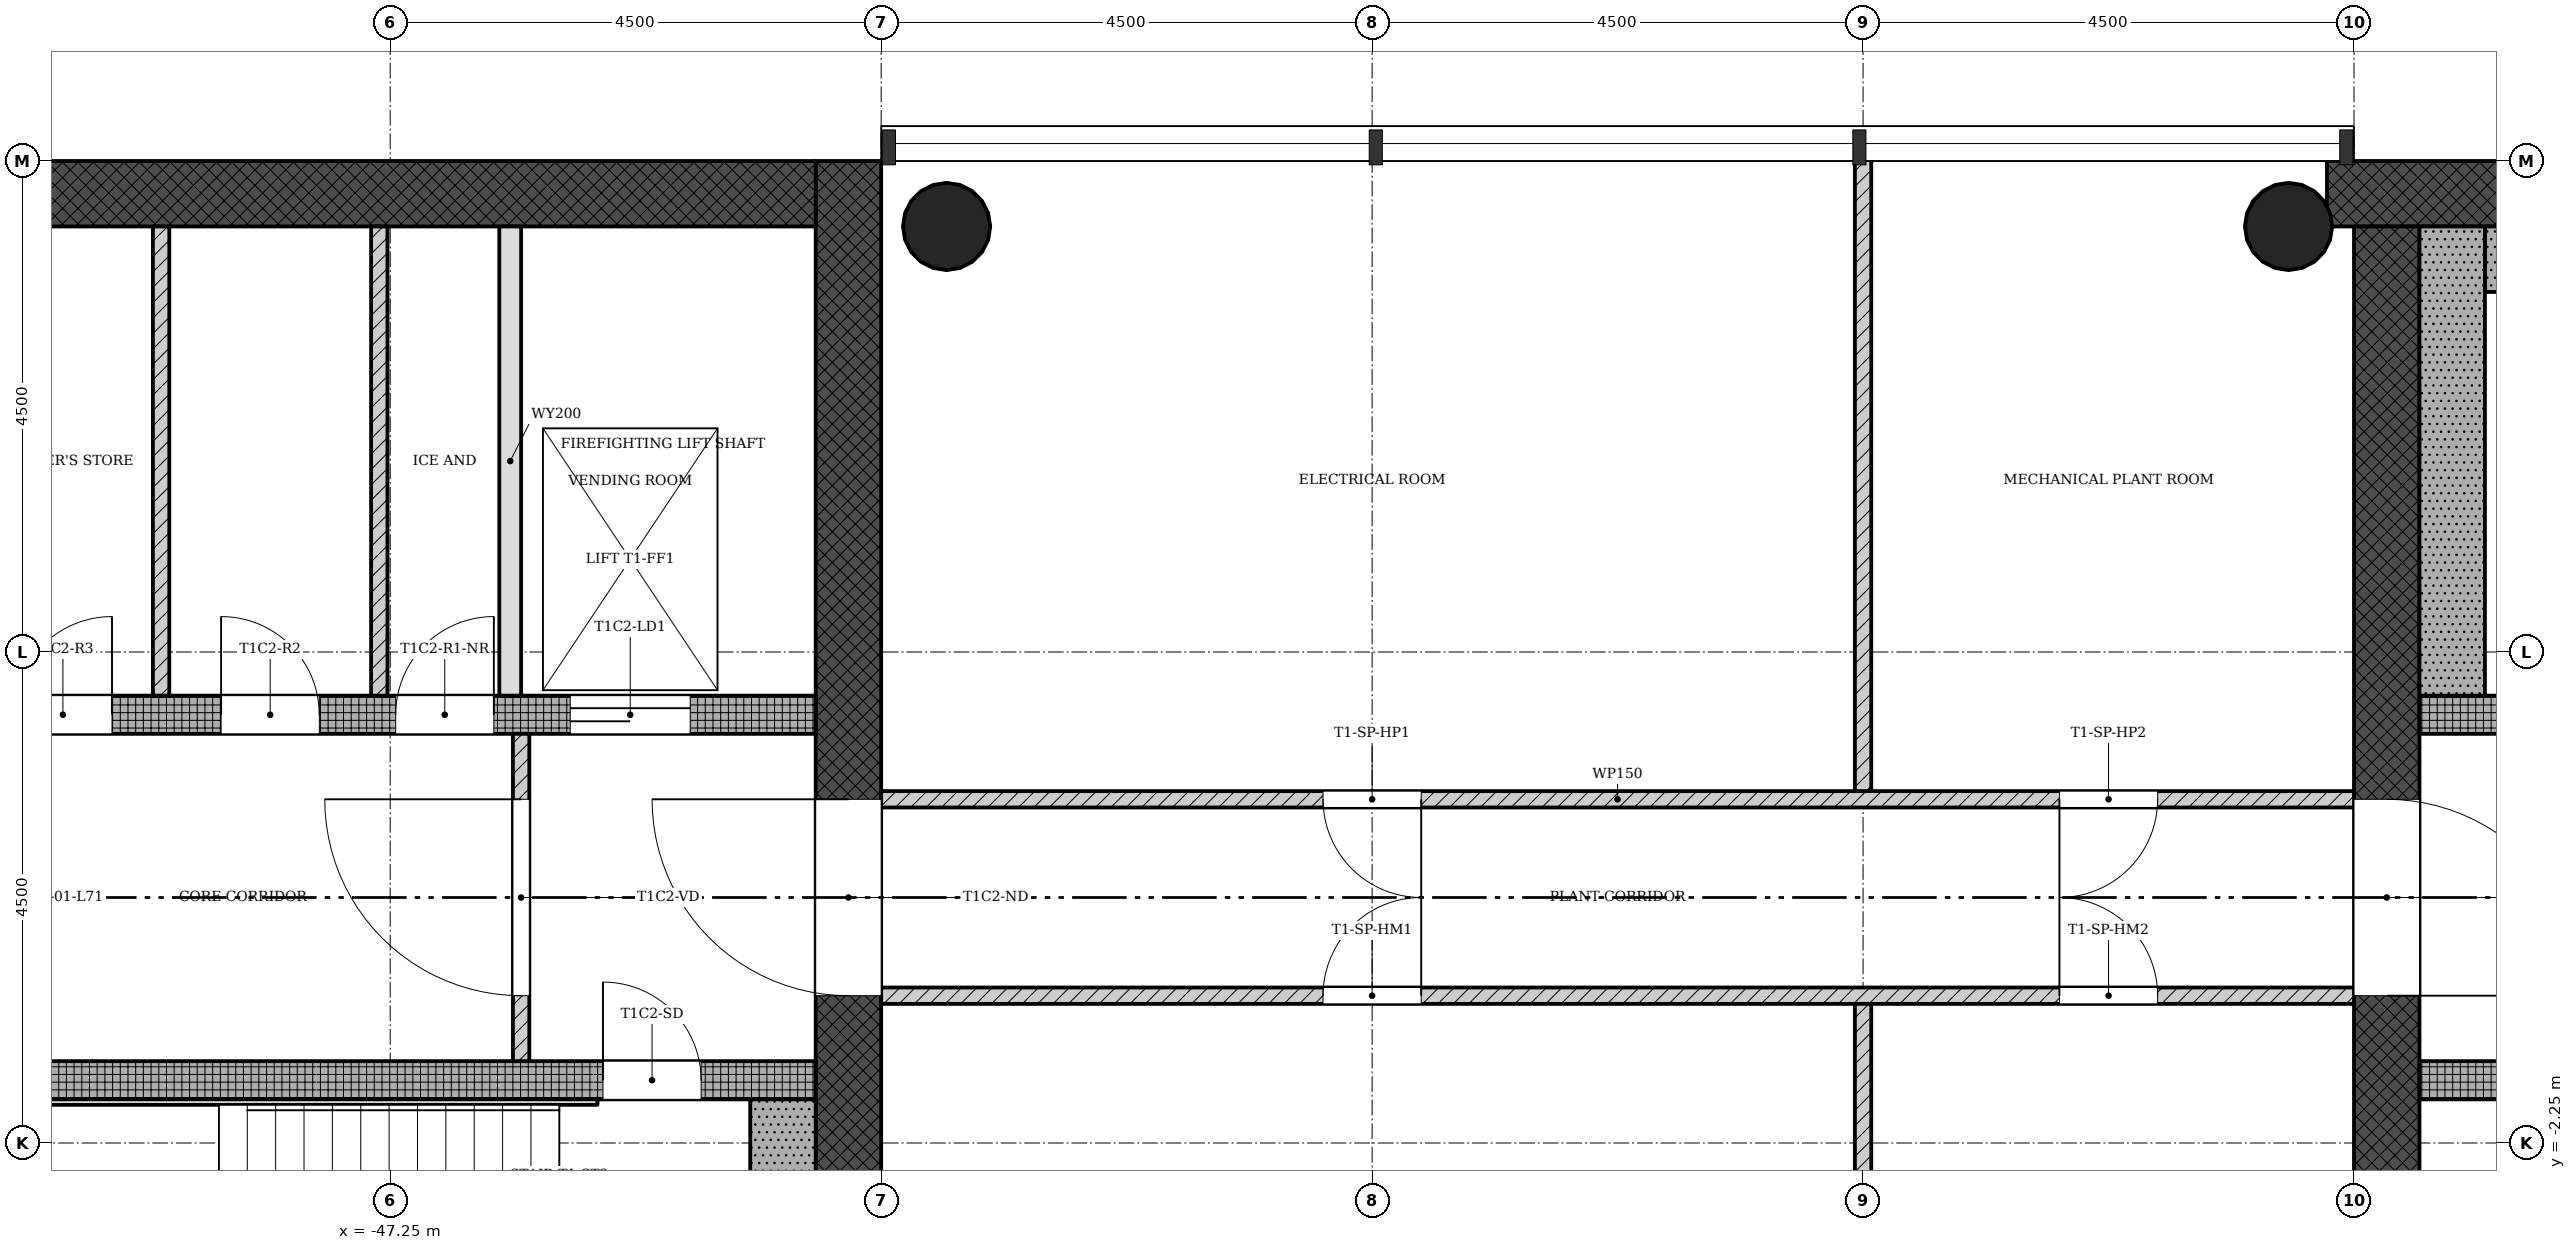
"""IFC4 building model, lengths in metres.
Left out: names, types, materials, properties, quantities, classifications, styles, units other than length and angle.
Written with IfcOpenShell. Run it as: python <this file> out.ifc"""

import sys

from ifc_helpers import new_model, si_unit, direction, frame, frame_2d, origin, origin_2d, place, context, subcontext, project, spatial, rectangle, hollow_circle, extrude, element, fill, save


model = new_model("IFC4")
c1 = context("Model", 3, precision=1e-05, world=origin(), true_north=direction((0.0, 1.0)))
c2 = subcontext(c1, "Body", "Model", "MODEL_VIEW")
j1 = project(units=[si_unit("LENGTHUNIT", "METRE"), si_unit("PLANEANGLEUNIT", "RADIAN")], contexts=[c1])
p1 = place(None, origin())
s1 = spatial("IfcSite", under=j1, at=p1, CompositionType="ELEMENT")
p2 = place(p1, origin())
s2 = spatial("IfcBuilding", under=s1, at=p2, CompositionType="ELEMENT")
p3 = place(p2, frame((0.0, 0.0, 260.4)))
s3 = spatial("IfcBuildingStorey", under=s2, at=p3, CompositionType="ELEMENT", Elevation=260.4)
p4 = place(p3, frame((-20.85, 6.45, 0.0), z_axis=(0.0, 0.0, 1.0), x_axis=(-1.0, 0.0, 0.0)))
e1 = element("IfcWall", 1, at=p4, inside=s3, PredefinedType="SHEAR", context=c2, shape_type="SweptSolid", body=[
    extrude(rectangle(XDim=8.648, YDim=0.6, at=frame_2d((4.324, 0.0))), origin(), (0.0, 0.0, 1.0), 4.5),
])
p5 = place(p3, frame((-28.95, 6.15, 0.0), z_axis=(0.0, 0.0, 1.0), x_axis=(0.0, -1.0, 0.0)))
e2 = element("IfcWall", 2, at=p5, inside=s3, PredefinedType="SHEAR", context=c2, shape_type="SweptSolid", body=[
    extrude(rectangle(XDim=12.9, YDim=0.6, at=frame_2d((6.45, 0.0))), origin(), (0.0, 0.0, 1.0), 4.5),
])
p6 = place(p5, frame((5.25, 0.0, 0.0)))
e3 = element("IfcOpeningElement", 3, at=p6, cuts=e2, PredefinedType="OPENING", context=c2, shape_type="SweptSolid", body=[
    extrude(rectangle(XDim=1.8, YDim=2.1, at=frame_2d((0.9, 1.05))), frame((0.0, 0.31, 0.0), z_axis=(0.0, -1.0, 0.0), x_axis=(1.0, 0.0, 0.0)), (0.0, 0.0, 1.0), 0.62),
])
p7 = place(p3, frame((-28.65, -1.675, 0.0), z_axis=(0.0, 0.0, 1.0), x_axis=(1.0, 0.0, 0.0)))
e4 = element("IfcWall", 4, at=p7, inside=s3, PredefinedType="SHEAR", context=c2, shape_type="SweptSolid", body=[
    extrude(rectangle(XDim=7.8, YDim=0.35, at=frame_2d((3.9, 0.0))), origin(), (0.0, 0.0, 1.0), 4.5),
])
p8 = place(p7, frame((1.15, 0.0, 0.0)))
e5 = element("IfcOpeningElement", 5, at=p8, cuts=e4, PredefinedType="OPENING", context=c2, shape_type="SweptSolid", body=[
    extrude(rectangle(XDim=0.9, YDim=2.1, at=frame_2d((0.45, 1.05))), frame((0.0, 0.185, 0.0), z_axis=(0.0, -1.0, 0.0), x_axis=(1.0, 0.0, 0.0)), (0.0, 0.0, 1.0), 0.37),
])
p9 = place(p7, frame((5.1, 0.0, 0.0)))
e6 = element("IfcOpeningElement", 6, at=p9, cuts=e4, PredefinedType="OPENING", context=c2, shape_type="SweptSolid", body=[
    extrude(rectangle(XDim=0.9, YDim=2.1, at=frame_2d((0.45, 1.05))), frame((0.0, 0.185, 0.0), z_axis=(0.0, -1.0, 0.0), x_axis=(1.0, 0.0, 0.0)), (0.0, 0.0, 1.0), 0.37),
])
p10 = place(p3, frame((-28.65, 1.675, 0.0), z_axis=(0.0, 0.0, 1.0), x_axis=(1.0, 0.0, 0.0)))
e7 = element("IfcWall", 7, at=p10, inside=s3, PredefinedType="SHEAR", context=c2, shape_type="SweptSolid", body=[
    extrude(rectangle(XDim=7.8, YDim=0.35, at=frame_2d((3.9, 0.0))), origin(), (0.0, 0.0, 1.0), 4.5),
])
p11 = place(p10, frame((1.05, 0.0, 0.0)))
e8 = element("IfcOpeningElement", 8, at=p11, cuts=e7, PredefinedType="OPENING", context=c2, shape_type="SweptSolid", body=[
    extrude(rectangle(XDim=0.9, YDim=2.1, at=frame_2d((0.45, 1.05))), frame((0.0, 0.185, 0.0), z_axis=(0.0, -1.0, 0.0), x_axis=(1.0, 0.0, 0.0)), (0.0, 0.0, 1.0), 0.37),
])
p12 = place(p3, frame((-43.05, -6.15, 0.0), z_axis=(0.0, 0.0, 1.0), x_axis=(0.0, 1.0, 0.0)))
e9 = element("IfcWall", 9, at=p12, inside=s3, PredefinedType="SHEAR", context=c2, shape_type="SweptSolid", body=[
    extrude(rectangle(XDim=12.9, YDim=0.6, at=frame_2d((6.45, 0.0))), origin(), (0.0, 0.0, 1.0), 4.5),
])
p13 = place(p12, frame((5.25, 0.0, 0.0)))
e10 = element("IfcOpeningElement", 10, at=p13, cuts=e9, PredefinedType="OPENING", context=c2, shape_type="SweptSolid", body=[
    extrude(rectangle(XDim=1.8, YDim=2.1, at=frame_2d((0.9, 1.05))), frame((0.0, 0.31, 0.0), z_axis=(0.0, -1.0, 0.0), x_axis=(1.0, 0.0, 0.0)), (0.0, 0.0, 1.0), 0.62),
])
p14 = place(p3, frame((-43.35, 6.45, 0.0), z_axis=(0.0, 0.0, 1.0), x_axis=(-1.0, 0.0, 0.0)))
e11 = element("IfcWall", 11, at=p14, inside=s3, PredefinedType="SHEAR", context=c2, shape_type="SweptSolid", body=[
    extrude(rectangle(XDim=8.4, YDim=0.6, at=frame_2d((4.2, 0.0))), origin(), (0.0, 0.0, 1.0), 4.5),
])
p15 = place(p3, frame((-51.15, -1.675, 0.0), z_axis=(0.0, 0.0, 1.0), x_axis=(1.0, 0.0, 0.0)))
e12 = element("IfcWall", 12, at=p15, inside=s3, PredefinedType="SHEAR", context=c2, shape_type="SweptSolid", body=[
    extrude(rectangle(XDim=7.8, YDim=0.35, at=frame_2d((3.9, 0.0))), origin(), (0.0, 0.0, 1.0), 4.5),
])
p16 = place(p15, frame((5.85, 0.0, 0.0)))
e13 = element("IfcOpeningElement", 13, at=p16, cuts=e12, PredefinedType="OPENING", context=c2, shape_type="SweptSolid", body=[
    extrude(rectangle(XDim=0.9, YDim=2.1, at=frame_2d((0.45, 1.05))), frame((0.0, 0.185, 0.0), z_axis=(0.0, -1.0, 0.0), x_axis=(1.0, 0.0, 0.0)), (0.0, 0.0, 1.0), 0.37),
])
p17 = place(p3, frame((-51.15, 1.675, 0.0), z_axis=(0.0, 0.0, 1.0), x_axis=(1.0, 0.0, 0.0)))
e14 = element("IfcWall", 14, at=p17, inside=s3, PredefinedType="SHEAR", context=c2, shape_type="SweptSolid", body=[
    extrude(rectangle(XDim=7.8, YDim=0.35, at=frame_2d((3.9, 0.0))), origin(), (0.0, 0.0, 1.0), 4.5),
])
p18 = place(p17, frame((5.55, 0.0, 0.0)))
e15 = element("IfcOpeningElement", 15, at=p18, cuts=e14, PredefinedType="OPENING", context=c2, shape_type="SweptSolid", body=[
    extrude(rectangle(XDim=1.1, YDim=2.1, at=frame_2d((0.55, 1.05))), frame((0.0, 0.185, 0.0), z_axis=(0.0, -1.0, 0.0), x_axis=(1.0, 0.0, 0.0)), (0.0, 0.0, 1.0), 0.37),
])
p19 = place(p17, frame((3.95, 0.0, 0.0)))
e16 = element("IfcOpeningElement", 16, at=p19, cuts=e14, PredefinedType="OPENING", context=c2, shape_type="SweptSolid", body=[
    extrude(rectangle(XDim=0.9, YDim=2.1, at=frame_2d((0.45, 1.05))), frame((0.0, 0.185, 0.0), z_axis=(0.0, -1.0, 0.0), x_axis=(1.0, 0.0, 0.0)), (0.0, 0.0, 1.0), 0.37),
])
p20 = place(p17, frame((2.35, 0.0, 0.0)))
e17 = element("IfcOpeningElement", 17, at=p20, cuts=e14, PredefinedType="OPENING", context=c2, shape_type="SweptSolid", body=[
    extrude(rectangle(XDim=0.9, YDim=2.1, at=frame_2d((0.45, 1.05))), frame((0.0, 0.185, 0.0), z_axis=(0.0, -1.0, 0.0), x_axis=(1.0, 0.0, 0.0)), (0.0, 0.0, 1.0), 0.37),
])
p21 = place(p17, frame((0.45, 0.0, 0.0)))
e18 = element("IfcOpeningElement", 18, at=p21, cuts=e14, PredefinedType="OPENING", context=c2, shape_type="SweptSolid", body=[
    extrude(rectangle(XDim=0.9, YDim=2.1, at=frame_2d((0.45, 1.05))), frame((0.0, 0.185, 0.0), z_axis=(0.0, -1.0, 0.0), x_axis=(1.0, 0.0, 0.0)), (0.0, 0.0, 1.0), 0.37),
])
for number, where, z_axis, x_axis in (
    (19, (-29.85, 6.15, 0.0), (0.0, 0.0, 1.0), (1.0, 0.0, 0.0)),
    (20, (-42.15, 6.15, 0.0), (0.0, 0.0, 1.0), (1.0, 0.0, 0.0)),
):
    element("IfcColumn", number, at=place(p3, frame(where, z_axis=z_axis, x_axis=x_axis)), inside=s3, PredefinedType="COLUMN", context=c2, shape_type="SweptSolid", body=[
        extrude(hollow_circle(Radius=0.4, WallThickness=0.028, at=origin_2d()), origin(), (0.0, 0.0, 1.0), 4.5),
    ])
p22 = place(p3, frame((-46.05, 1.5, 0.0), z_axis=(0.0, 0.0, 1.0), x_axis=(0.0, -1.0, 0.0)))
e21 = element("IfcWall", 21, at=p22, inside=s3, PredefinedType="PARTITIONING", context=c2, shape_type="SweptSolid", body=[
    extrude(rectangle(XDim=3.0, YDim=0.15, at=frame_2d((1.5, 0.0))), origin(), (0.0, 0.0, 1.0), 4.09),
])
p23 = place(p22, frame((0.6, 0.0, 0.0)))
e22 = element("IfcOpeningElement", 22, at=p23, cuts=e21, PredefinedType="OPENING", context=c2, shape_type="SweptSolid", body=[
    extrude(rectangle(XDim=1.8, YDim=2.1, at=frame_2d((0.9, 1.05))), frame((0.0, 0.085, 0.0), z_axis=(0.0, -1.0, 0.0), x_axis=(1.0, 0.0, 0.0)), (0.0, 0.0, 1.0), 0.17),
])
p24 = place(p3, frame((-46.15, 6.15, 0.0), z_axis=(0.0, 0.0, 1.0), x_axis=(0.0, -1.0, 0.0)))
e23 = element("IfcWall", 23, at=p24, inside=s3, PredefinedType="SOLIDWALL", context=c2, shape_type="SweptSolid", body=[
    extrude(rectangle(XDim=4.3, YDim=0.2, at=frame_2d((2.15, 0.0))), origin(), (0.0, 0.0, 1.0), 4.09),
])
for number, where, z_axis, x_axis in (
    (24, (-47.35, 6.15, 0.0), (0.0, 0.0, 1.0), (0.0, -1.0, 0.0)),
    (25, (-49.35, 6.15, 0.0), (0.0, 0.0, 1.0), (0.0, -1.0, 0.0)),
):
    element("IfcWall", number, at=place(p3, frame(where, z_axis=z_axis, x_axis=x_axis)), inside=s3, PredefinedType="PARTITIONING", context=c2, shape_type="SweptSolid", body=[
        extrude(rectangle(XDim=4.3, YDim=0.15, at=frame_2d((2.15, 0.0))), origin(), (0.0, 0.0, 1.0), 4.09),
    ])
p25 = place(p3, frame((-42.75, 0.9, 0.0), z_axis=(0.0, 0.0, 1.0), x_axis=(1.0, 0.0, 0.0)))
e26 = element("IfcWall", 26, at=p25, inside=s3, PredefinedType="PARTITIONING", context=c2, shape_type="SweptSolid", body=[
    extrude(rectangle(XDim=13.5, YDim=0.15, at=frame_2d((6.75, 0.0))), origin(), (0.0, 0.0, 1.0), 4.09),
])
p26 = place(p25, frame((4.05, 0.0, 0.0)))
e27 = element("IfcOpeningElement", 27, at=p26, cuts=e26, PredefinedType="OPENING", context=c2, shape_type="SweptSolid", body=[
    extrude(rectangle(XDim=0.9, YDim=2.1, at=frame_2d((0.45, 1.05))), frame((0.0, 0.085, 0.0), z_axis=(0.0, -1.0, 0.0), x_axis=(1.0, 0.0, 0.0)), (0.0, 0.0, 1.0), 0.17),
])
p27 = place(p25, frame((10.8, 0.0, 0.0)))
e28 = element("IfcOpeningElement", 28, at=p27, cuts=e26, PredefinedType="OPENING", context=c2, shape_type="SweptSolid", body=[
    extrude(rectangle(XDim=0.9, YDim=2.1, at=frame_2d((0.45, 1.05))), frame((0.0, 0.085, 0.0), z_axis=(0.0, -1.0, 0.0), x_axis=(1.0, 0.0, 0.0)), (0.0, 0.0, 1.0), 0.17),
])
p28 = place(p3, frame((-33.75, 0.975, 0.0), z_axis=(0.0, 0.0, 1.0), x_axis=(0.0, 1.0, 0.0)))
e29 = element("IfcWall", 29, at=p28, inside=s3, PredefinedType="PARTITIONING", context=c2, shape_type="SweptSolid", body=[
    extrude(rectangle(XDim=5.875, YDim=0.15, at=frame_2d((2.938, 0.0))), origin(), (0.0, 0.0, 1.0), 4.09),
])
p29 = place(p3, frame((-42.75, -0.9, 0.0), z_axis=(0.0, 0.0, 1.0), x_axis=(1.0, 0.0, 0.0)))
e30 = element("IfcWall", 30, at=p29, inside=s3, PredefinedType="PARTITIONING", context=c2, shape_type="SweptSolid", body=[
    extrude(rectangle(XDim=13.5, YDim=0.15, at=frame_2d((6.75, 0.0))), origin(), (0.0, 0.0, 1.0), 4.09),
])
p30 = place(p29, frame((4.05, 0.0, 0.0)))
e31 = element("IfcOpeningElement", 31, at=p30, cuts=e30, PredefinedType="OPENING", context=c2, shape_type="SweptSolid", body=[
    extrude(rectangle(XDim=0.9, YDim=2.1, at=frame_2d((0.45, 1.05))), frame((0.0, 0.085, 0.0), z_axis=(0.0, -1.0, 0.0), x_axis=(1.0, 0.0, 0.0)), (0.0, 0.0, 1.0), 0.17),
])
p31 = place(p29, frame((10.8, 0.0, 0.0)))
e32 = element("IfcOpeningElement", 32, at=p31, cuts=e30, PredefinedType="OPENING", context=c2, shape_type="SweptSolid", body=[
    extrude(rectangle(XDim=0.9, YDim=2.1, at=frame_2d((0.45, 1.05))), frame((0.0, 0.085, 0.0), z_axis=(0.0, -1.0, 0.0), x_axis=(1.0, 0.0, 0.0)), (0.0, 0.0, 1.0), 0.17),
])
p32 = place(p3, frame((-33.75, -0.975, 0.0), z_axis=(0.0, 0.0, 1.0), x_axis=(0.0, -1.0, 0.0)))
e33 = element("IfcWall", 33, at=p32, inside=s3, PredefinedType="PARTITIONING", context=c2, shape_type="SweptSolid", body=[
    extrude(rectangle(XDim=5.875, YDim=0.15, at=frame_2d((2.938, 0.0))), origin(), (0.0, 0.0, 1.0), 4.09),
])
p33 = place(p3, frame((-28.05, 5.85, 0.0), z_axis=(0.0, 0.0, 1.0), x_axis=(1.0, 0.0, 0.0)))
e34 = element("IfcWall", 34, at=p33, inside=s3, PredefinedType="SHEAR", context=c2, shape_type="SweptSolid", body=[
    extrude(rectangle(XDim=6.6, YDim=0.6, at=frame_2d((3.3, 0.0))), origin(), (0.0, 0.0, 1.0), 4.5),
])
for number, where, z_axis, x_axis in (
    (35, (-28.35, 1.85, 0.0), (0.0, 0.0, 1.0), (0.0, 1.0, 0.0)),
    (36, (-43.65, -1.85, 0.0), (0.0, 0.0, 1.0), (0.0, -1.0, 0.0)),
):
    element("IfcWall", number, at=place(p3, frame(where, z_axis=z_axis, x_axis=x_axis)), inside=s3, PredefinedType="SHEAR", context=c2, shape_type="SweptSolid", body=[
        extrude(rectangle(XDim=4.3, YDim=0.6, at=frame_2d((2.15, 0.0))), origin(), (0.0, 0.0, 1.0), 4.5),
    ])
p34 = place(p3, frame((-45.35, -1.875, 0.0), z_axis=(0.0, 0.0, 1.0), x_axis=(-1.0, 0.0, 0.0)))
e37 = element("IfcWall", 37, at=p34, inside=s3, PredefinedType="SHEAR", context=c2, shape_type="SweptSolid", body=[
    extrude(rectangle(XDim=5.2, YDim=0.05, at=frame_2d((2.6, 0.0))), origin(), (0.0, 0.0, 1.0), 4.5),
])
p35 = place(p23, origin())
e38 = element("IfcDoor", 38, at=p35, inside=s3, OperationType="SINGLE_SWING_LEFT", PredefinedType="DOOR", context=c2, shape_type="SweptSolid", body=[
    extrude(rectangle(XDim=1.8, YDim=2.1, at=frame_2d((0.9, 1.05))), frame((0.0, 0.025, 0.0), z_axis=(0.0, -1.0, 0.0), x_axis=(1.0, 0.0, 0.0)), (0.0, 0.0, 1.0), 0.05),
])
fill(e22, e38)
p36 = place(p26, origin())
e39 = element("IfcDoor", 39, at=p36, inside=s3, OperationType="SINGLE_SWING_RIGHT", PredefinedType="DOOR", context=c2, shape_type="SweptSolid", body=[
    extrude(rectangle(XDim=0.9, YDim=2.1, at=frame_2d((0.45, 1.05))), frame((0.0, 0.025, 0.0), z_axis=(0.0, -1.0, 0.0), x_axis=(1.0, 0.0, 0.0)), (0.0, 0.0, 1.0), 0.05),
])
fill(e27, e39)
p37 = place(p27, origin())
e40 = element("IfcDoor", 40, at=p37, inside=s3, OperationType="SINGLE_SWING_LEFT", PredefinedType="DOOR", context=c2, shape_type="SweptSolid", body=[
    extrude(rectangle(XDim=0.9, YDim=2.1, at=frame_2d((0.45, 1.05))), frame((0.0, 0.025, 0.0), z_axis=(0.0, -1.0, 0.0), x_axis=(1.0, 0.0, 0.0)), (0.0, 0.0, 1.0), 0.05),
])
fill(e28, e40)
p38 = place(p30, origin())
e41 = element("IfcDoor", 41, at=p38, inside=s3, OperationType="SINGLE_SWING_LEFT", PredefinedType="DOOR", context=c2, shape_type="SweptSolid", body=[
    extrude(rectangle(XDim=0.9, YDim=2.1, at=frame_2d((0.45, 1.05))), frame((0.0, 0.025, 0.0), z_axis=(0.0, -1.0, 0.0), x_axis=(1.0, 0.0, 0.0)), (0.0, 0.0, 1.0), 0.05),
])
fill(e31, e41)
p39 = place(p31, origin())
e42 = element("IfcDoor", 42, at=p39, inside=s3, OperationType="SINGLE_SWING_RIGHT", PredefinedType="DOOR", context=c2, shape_type="SweptSolid", body=[
    extrude(rectangle(XDim=0.9, YDim=2.1, at=frame_2d((0.45, 1.05))), frame((0.0, 0.025, 0.0), z_axis=(0.0, -1.0, 0.0), x_axis=(1.0, 0.0, 0.0)), (0.0, 0.0, 1.0), 0.05),
])
fill(e32, e42)
p40 = place(p6, origin())
e43 = element("IfcDoor", 43, at=p40, inside=s3, OperationType="SINGLE_SWING_LEFT", PredefinedType="DOOR", context=c2, shape_type="SweptSolid", body=[
    extrude(rectangle(XDim=1.8, YDim=2.1, at=frame_2d((0.9, 1.05))), frame((0.0, 0.025, 0.0), z_axis=(0.0, -1.0, 0.0), x_axis=(1.0, 0.0, 0.0)), (0.0, 0.0, 1.0), 0.05),
])
fill(e3, e43)
p41 = place(p16, origin())
e44 = element("IfcDoor", 44, at=p41, inside=s3, OperationType="SINGLE_SWING_RIGHT", PredefinedType="DOOR", context=c2, shape_type="SweptSolid", body=[
    extrude(rectangle(XDim=0.9, YDim=2.1, at=frame_2d((0.45, 1.05))), frame((0.0, 0.025, 0.0), z_axis=(0.0, -1.0, 0.0), x_axis=(1.0, 0.0, 0.0)), (0.0, 0.0, 1.0), 0.05),
])
fill(e13, e44)
p42 = place(p18, origin())
e45 = element("IfcDoor", 45, at=p42, inside=s3, OperationType="SLIDING_TO_LEFT", PredefinedType="DOOR", context=c2, shape_type="SweptSolid", body=[
    extrude(rectangle(XDim=1.1, YDim=2.1, at=frame_2d((0.55, 1.05))), frame((0.0, 0.025, 0.0), z_axis=(0.0, -1.0, 0.0), x_axis=(1.0, 0.0, 0.0)), (0.0, 0.0, 1.0), 0.05),
])
fill(e15, e45)
p43 = place(p19, origin())
e46 = element("IfcDoor", 46, at=p43, inside=s3, OperationType="SINGLE_SWING_LEFT", PredefinedType="DOOR", context=c2, shape_type="SweptSolid", body=[
    extrude(rectangle(XDim=0.9, YDim=2.1, at=frame_2d((0.45, 1.05))), frame((0.0, 0.025, 0.0), z_axis=(0.0, -1.0, 0.0), x_axis=(1.0, 0.0, 0.0)), (0.0, 0.0, 1.0), 0.05),
])
fill(e16, e46)
p44 = place(p20, origin())
e47 = element("IfcDoor", 47, at=p44, inside=s3, OperationType="SINGLE_SWING_RIGHT", PredefinedType="DOOR", context=c2, shape_type="SweptSolid", body=[
    extrude(rectangle(XDim=0.9, YDim=2.1, at=frame_2d((0.45, 1.05))), frame((0.0, 0.025, 0.0), z_axis=(0.0, -1.0, 0.0), x_axis=(1.0, 0.0, 0.0)), (0.0, 0.0, 1.0), 0.05),
])
fill(e17, e47)
p45 = place(p21, origin())
e48 = element("IfcDoor", 48, at=p45, inside=s3, OperationType="SINGLE_SWING_LEFT", PredefinedType="DOOR", context=c2, shape_type="SweptSolid", body=[
    extrude(rectangle(XDim=0.9, YDim=2.1, at=frame_2d((0.45, 1.05))), frame((0.0, 0.025, 0.0), z_axis=(0.0, -1.0, 0.0), x_axis=(1.0, 0.0, 0.0)), (0.0, 0.0, 1.0), 0.05),
])
fill(e18, e48)
p46 = place(p13, origin())
e49 = element("IfcDoor", 49, at=p46, inside=s3, OperationType="SINGLE_SWING_LEFT", PredefinedType="DOOR", context=c2, shape_type="SweptSolid", body=[
    extrude(rectangle(XDim=1.8, YDim=2.1, at=frame_2d((0.9, 1.05))), frame((0.0, 0.025, 0.0), z_axis=(0.0, -1.0, 0.0), x_axis=(1.0, 0.0, 0.0)), (0.0, 0.0, 1.0), 0.05),
])
fill(e10, e49)
save(model, sys.argv[1])
